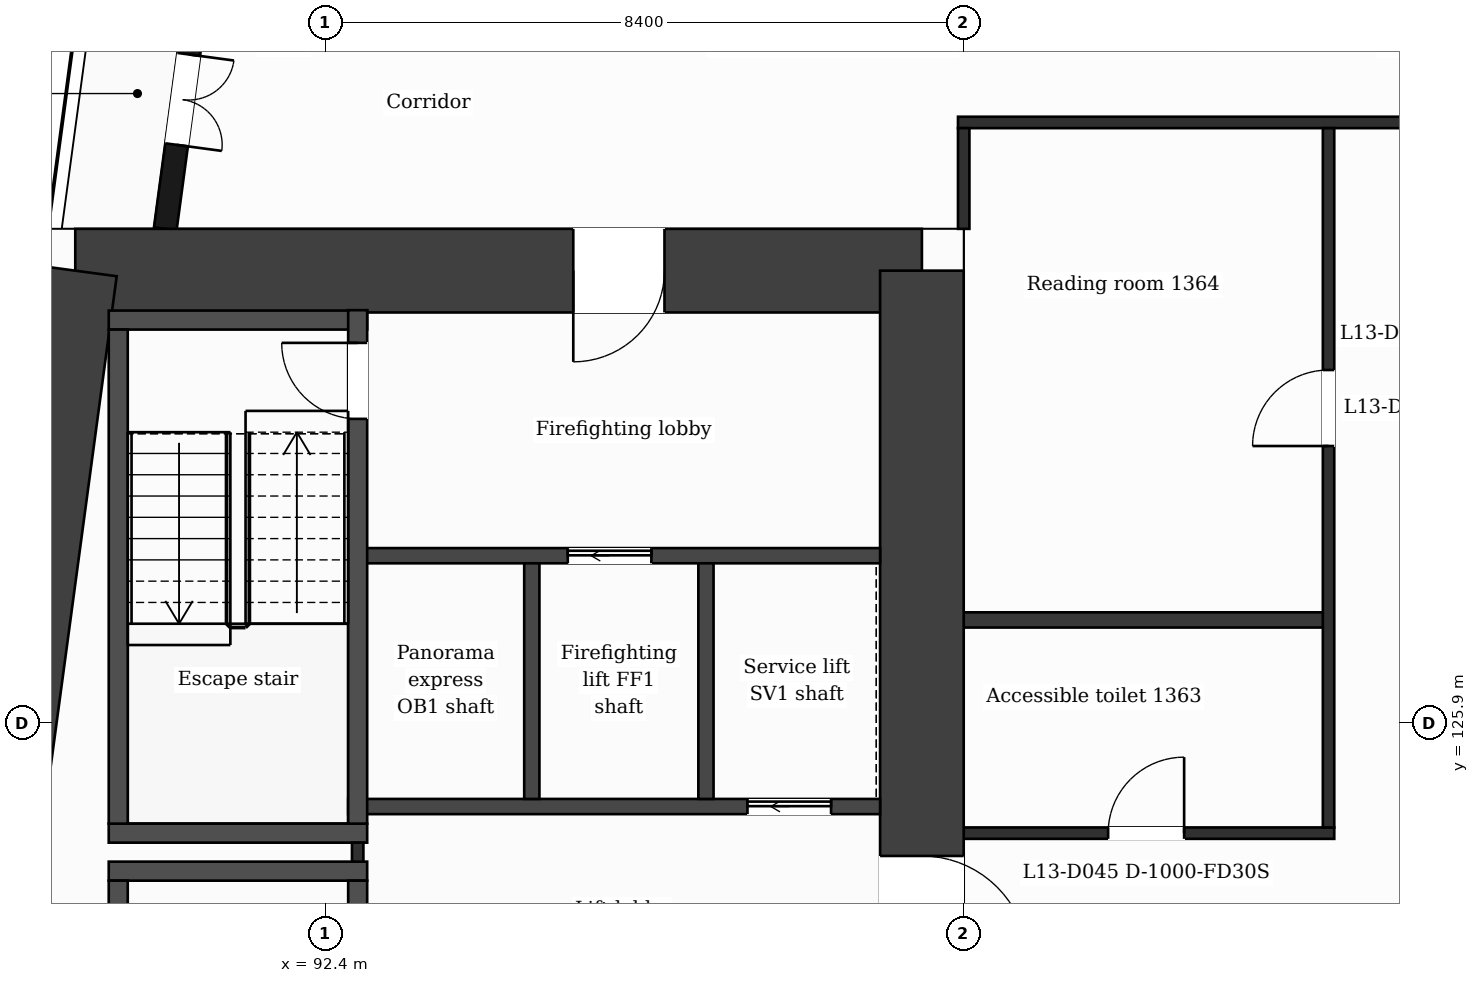
"""IFC4 building model, lengths in metres.
Left out: names, types, materials, properties, quantities, classifications, styles, units other than length and angle.
Written with IfcOpenShell. Run it as: python <this file> out.ifc"""

import sys

from ifc_helpers import new_model, si_unit, direction, frame, frame_2d, origin, place, context, subcontext, project, spatial, rectangle, extrude, element, fill, save


model = new_model("IFC4")
c1 = context("Model", 3, precision=1e-05, world=origin(), true_north=direction((0.0, 1.0)))
c2 = subcontext(c1, "Body", "Model", "MODEL_VIEW")
j1 = project(units=[si_unit("LENGTHUNIT", "METRE"), si_unit("PLANEANGLEUNIT", "RADIAN")], contexts=[c1])
p1 = place(None, origin())
s1 = spatial("IfcSite", under=j1, at=p1, CompositionType="ELEMENT")
p2 = place(p1, origin())
s2 = spatial("IfcBuilding", under=s1, at=p2, CompositionType="ELEMENT")
p3 = place(p2, frame((0.0, 0.0, 63.5)))
s3 = spatial("IfcBuildingStorey", under=s2, at=p3, CompositionType="ELEMENT", Elevation=63.5)
p4 = place(p3, frame((89.112, 131.85, 0.0), z_axis=(0.0, 0.0, 1.0), x_axis=(1.0, 0.0, 0.0)))
e1 = element("IfcWall", 1, at=p4, inside=s3, PredefinedType="SHEAR", context=c2, shape_type="SweptSolid", body=[
    extrude(rectangle(XDim=11.138, YDim=1.1, at=frame_2d((5.569, 0.0))), origin(), (0.0, 0.0, 1.0), 3.5),
])
p5 = place(p4, frame((6.552, 0.0, 0.0)))
e2 = element("IfcOpeningElement", 2, at=p5, cuts=e1, PredefinedType="OPENING", context=c2, shape_type="SweptSolid", body=[
    extrude(rectangle(XDim=1.2, YDim=2.1, at=frame_2d((0.6, 1.05))), frame((0.0, 0.56, 0.0), z_axis=(0.0, -1.0, 0.0), x_axis=(1.0, 0.0, 0.0)), (0.0, 0.0, 1.0), 1.12),
])
p6 = place(p3, frame((100.25, 131.85, 0.0), z_axis=(0.0, 0.0, 1.0), x_axis=(0.0, -1.0, 0.0)))
e3 = element("IfcWall", 3, at=p6, inside=s3, PredefinedType="SHEAR", context=c2, shape_type="SweptSolid", body=[
    extrude(rectangle(XDim=20.9, YDim=1.1, at=frame_2d((10.45, 0.0))), origin(), (0.0, 0.0, 1.0), 3.5),
])
p7 = place(p6, frame((7.7, 0.0, 0.0)))
e4 = element("IfcOpeningElement", 4, at=p7, cuts=e3, PredefinedType="OPENING", context=c2, shape_type="SweptSolid", body=[
    extrude(rectangle(XDim=1.4, YDim=2.1, at=frame_2d((0.7, 1.05))), frame((0.0, 0.56, 0.0), z_axis=(0.0, -1.0, 0.0), x_axis=(1.0, 0.0, 0.0)), (0.0, 0.0, 1.0), 1.12),
])
p8 = place(p3, frame((86.298, 110.95, 0.0), z_axis=(0.0, 0.0, 1.0), x_axis=(0.133400422634, 0.99106222168, 0.0)))
e5 = element("IfcWall", 5, at=p8, inside=s3, PredefinedType="SHEAR", context=c2, shape_type="SweptSolid", body=[
    extrude(rectangle(XDim=21.089, YDim=1.1, at=frame_2d((10.544, 0.0))), origin(), (0.0, 0.0, 1.0), 3.5),
])
p9 = place(p3, frame((91.177, 138.95, 0.0), z_axis=(0.0, 0.0, 1.0), x_axis=(-0.133426664613, -0.991058689065, 0.0)))
e6 = element("IfcWall", 6, at=p9, inside=s3, PredefinedType="SOLIDWALL", context=c2, shape_type="SweptSolid", body=[
    extrude(rectangle(XDim=6.609, YDim=0.3, at=frame_2d((3.305, 0.0))), origin(), (0.0, 0.0, 1.0), 3.18),
])
p10 = place(p9, frame((1.039, 0.0, 0.9)))
e7 = element("IfcOpeningElement", 7, at=p10, cuts=e6, PredefinedType="OPENING", context=c2, shape_type="SweptSolid", body=[
    extrude(rectangle(XDim=1.2, YDim=2.1, at=frame_2d((0.6, 1.05))), frame((0.0, 0.16, 0.0), z_axis=(0.0, -1.0, 0.0), x_axis=(1.0, 0.0, 0.0)), (0.0, 0.0, 1.0), 0.32),
])
p11 = place(p9, frame((4.294, 0.0, 0.0)))
e8 = element("IfcOpeningElement", 8, at=p11, cuts=e6, PredefinedType="OPENING", context=c2, shape_type="SweptSolid", body=[
    extrude(rectangle(XDim=1.2, YDim=2.4, at=frame_2d((0.6, 1.2))), frame((0.0, 0.16, 0.0), z_axis=(0.0, -1.0, 0.0), x_axis=(1.0, 0.0, 0.0)), (0.0, 0.0, 1.0), 0.32),
])
for number, where, z_axis, x_axis in (
    (9, (89.552, 123.95, 0.0), (0.0, 0.0, 1.0), (1.0, 0.0, 0.0)),
    (10, (89.552, 124.45, 0.0), (0.0, 0.0, 1.0), (1.0, 0.0, 0.0)),
):
    element("IfcWall", number, at=place(p3, frame(where, z_axis=z_axis, x_axis=x_axis)), inside=s3, PredefinedType="PARTITIONING", context=c2, shape_type="SweptSolid", body=[
        extrude(rectangle(XDim=3.4, YDim=0.25, at=frame_2d((1.7, 0.0))), origin(), (0.0, 0.0, 1.0), 3.18),
    ])
p12 = place(p3, frame((100.8, 124.45, 0.0), z_axis=(0.0, 0.0, 1.0), x_axis=(1.0, 0.0, 0.0)))
e11 = element("IfcWall", 11, at=p12, inside=s3, PredefinedType="PARTITIONING", context=c2, shape_type="SweptSolid", body=[
    extrude(rectangle(XDim=4.875, YDim=0.15, at=frame_2d((2.438, 0.0))), origin(), (0.0, 0.0, 1.0), 3.18),
])
p13 = place(p12, frame((1.9, 0.0, 0.0)))
e12 = element("IfcOpeningElement", 12, at=p13, cuts=e11, PredefinedType="OPENING", context=c2, shape_type="SweptSolid", body=[
    extrude(rectangle(XDim=1.0, YDim=2.1, at=frame_2d((0.5, 1.05))), frame((0.0, 0.085, 0.0), z_axis=(0.0, -1.0, 0.0), x_axis=(1.0, 0.0, 0.0)), (0.0, 0.0, 1.0), 0.17),
])
p14 = place(p3, frame((92.702, 124.8, 0.0), z_axis=(0.0, 0.0, 1.0), x_axis=(1.0, 0.0, 0.0)))
e13 = element("IfcWall", 13, at=p14, inside=s3, PredefinedType="PARTITIONING", context=c2, shape_type="SweptSolid", body=[
    extrude(rectangle(XDim=6.998, YDim=0.2, at=frame_2d((3.499, 0.0))), origin(), (0.0, 0.0, 1.0), 3.18),
])
p15 = place(p14, frame((5.253, 0.0, 0.0)))
e14 = element("IfcOpeningElement", 14, at=p15, cuts=e13, PredefinedType="OPENING", context=c2, shape_type="SweptSolid", body=[
    extrude(rectangle(XDim=1.1, YDim=2.1, at=frame_2d((0.55, 1.05))), frame((0.0, 0.11, 0.0), z_axis=(0.0, -1.0, 0.0), x_axis=(1.0, 0.0, 0.0)), (0.0, 0.0, 1.0), 0.22),
])
p16 = place(p3, frame((100.8, 127.255, 0.0), z_axis=(0.0, 0.0, 1.0), x_axis=(1.0, 0.0, 0.0)))
e15 = element("IfcWall", 15, at=p16, inside=s3, PredefinedType="PARTITIONING", context=c2, shape_type="SweptSolid", body=[
    extrude(rectangle(XDim=4.8, YDim=0.2, at=frame_2d((2.4, 0.0))), origin(), (0.0, 0.0, 1.0), 3.18),
])
p17 = place(p3, frame((92.827, 128.1, 0.0), z_axis=(0.0, 0.0, 1.0), x_axis=(1.0, 0.0, 0.0)))
e16 = element("IfcWall", 16, at=p17, inside=s3, PredefinedType="PARTITIONING", context=c2, shape_type="SweptSolid", body=[
    extrude(rectangle(XDim=6.873, YDim=0.2, at=frame_2d((3.437, 0.0))), origin(), (0.0, 0.0, 1.0), 3.18),
])
p18 = place(p17, frame((2.764, 0.0, 0.0)))
e17 = element("IfcOpeningElement", 17, at=p18, cuts=e16, PredefinedType="OPENING", context=c2, shape_type="SweptSolid", body=[
    extrude(rectangle(XDim=1.1, YDim=2.1, at=frame_2d((0.55, 1.05))), frame((0.0, 0.11, 0.0), z_axis=(0.0, -1.0, 0.0), x_axis=(1.0, 0.0, 0.0)), (0.0, 0.0, 1.0), 0.22),
])
p19 = place(p3, frame((89.552, 131.2, 0.0), z_axis=(0.0, 0.0, 1.0), x_axis=(1.0, 0.0, 0.0)))
e18 = element("IfcWall", 18, at=p19, inside=s3, PredefinedType="PARTITIONING", context=c2, shape_type="SweptSolid", body=[
    extrude(rectangle(XDim=3.4, YDim=0.25, at=frame_2d((1.7, 0.0))), origin(), (0.0, 0.0, 1.0), 3.18),
])
p20 = place(p3, frame((100.725, 133.8, 0.0), z_axis=(0.0, 0.0, 1.0), x_axis=(1.0, 0.0, 0.0)))
e19 = element("IfcWall", 19, at=p20, inside=s3, PredefinedType="PARTITIONING", context=c2, shape_type="SweptSolid", body=[
    extrude(rectangle(XDim=25.35, YDim=0.15, at=frame_2d((12.675, 0.0))), origin(), (0.0, 0.0, 1.0), 3.18),
])
p21 = place(p3, frame((89.677, 117.07, 0.0), z_axis=(0.0, 0.0, 1.0), x_axis=(0.0, 1.0, 0.0)))
e20 = element("IfcWall", 20, at=p21, inside=s3, PredefinedType="PARTITIONING", context=c2, shape_type="SweptSolid", body=[
    extrude(rectangle(XDim=6.755, YDim=0.25, at=frame_2d((3.377, 0.0))), origin(), (0.0, 0.0, 1.0), 3.18),
])
p22 = place(p3, frame((89.677, 124.575, 0.0), z_axis=(0.0, 0.0, 1.0), x_axis=(0.0, 1.0, 0.0)))
e21 = element("IfcWall", 21, at=p22, inside=s3, PredefinedType="PARTITIONING", context=c2, shape_type="SweptSolid", body=[
    extrude(rectangle(XDim=6.5, YDim=0.25, at=frame_2d((3.25, 0.0))), origin(), (0.0, 0.0, 1.0), 3.18),
])
p23 = place(p3, frame((92.827, 124.075, 0.0), z_axis=(0.0, 0.0, 1.0), x_axis=(0.0, 1.0, 0.0)))
e22 = element("IfcWall", 22, at=p23, inside=s3, PredefinedType="PARTITIONING", context=c2, shape_type="SweptSolid", body=[
    extrude(rectangle(XDim=0.25, YDim=0.15, at=frame_2d((0.125, 0.0))), origin(), (0.0, 0.0, 1.0), 3.18),
])
p24 = place(p3, frame((92.827, 117.07, 0.0), z_axis=(0.0, 0.0, 1.0), x_axis=(0.0, 1.0, 0.0)))
e23 = element("IfcWall", 23, at=p24, inside=s3, PredefinedType="PARTITIONING", context=c2, shape_type="SweptSolid", body=[
    extrude(rectangle(XDim=6.755, YDim=0.25, at=frame_2d((3.377, 0.0))), origin(), (0.0, 0.0, 1.0), 3.18),
])
p25 = place(p24, frame((5.455, 0.0, 0.0)))
e24 = element("IfcOpeningElement", 24, at=p25, cuts=e23, PredefinedType="OPENING", context=c2, shape_type="SweptSolid", body=[
    extrude(rectangle(XDim=0.95, YDim=2.1, at=frame_2d((0.475, 1.05))), frame((0.0, 0.135, 0.0), z_axis=(0.0, -1.0, 0.0), x_axis=(1.0, 0.0, 0.0)), (0.0, 0.0, 1.0), 0.27),
])
p26 = place(p3, frame((92.827, 124.575, 0.0), z_axis=(0.0, 0.0, 1.0), x_axis=(0.0, 1.0, 0.0)))
e25 = element("IfcWall", 25, at=p26, inside=s3, PredefinedType="PARTITIONING", context=c2, shape_type="SweptSolid", body=[
    extrude(rectangle(XDim=6.755, YDim=0.25, at=frame_2d((3.377, 0.0))), origin(), (0.0, 0.0, 1.0), 3.18),
])
p27 = place(p26, frame((5.325, 0.0, 0.0)))
e26 = element("IfcOpeningElement", 26, at=p27, cuts=e25, PredefinedType="OPENING", context=c2, shape_type="SweptSolid", body=[
    extrude(rectangle(XDim=1.0, YDim=2.1, at=frame_2d((0.5, 1.05))), frame((0.0, 0.135, 0.0), z_axis=(0.0, -1.0, 0.0), x_axis=(1.0, 0.0, 0.0)), (0.0, 0.0, 1.0), 0.27),
])
for number, where, z_axis, x_axis in (
    (27, (95.118, 124.9, 0.0), (0.0, 0.0, 1.0), (0.0, 1.0, 0.0)),
    (28, (97.409, 124.9, 0.0), (0.0, 0.0, 1.0), (0.0, 1.0, 0.0)),
):
    element("IfcWall", number, at=place(p3, frame(where, z_axis=z_axis, x_axis=x_axis)), inside=s3, PredefinedType="PARTITIONING", context=c2, shape_type="SweptSolid", body=[
        extrude(rectangle(XDim=3.1, YDim=0.2, at=frame_2d((1.55, 0.0))), origin(), (0.0, 0.0, 1.0), 3.18),
    ])
p28 = place(p3, frame((100.8, 132.4, 0.0), z_axis=(0.0, 0.0, 1.0), x_axis=(0.0, 1.0, 0.0)))
e29 = element("IfcWall", 29, at=p28, inside=s3, PredefinedType="PARTITIONING", context=c2, shape_type="SweptSolid", body=[
    extrude(rectangle(XDim=1.325, YDim=0.15, at=frame_2d((0.663, 0.0))), origin(), (0.0, 0.0, 1.0), 3.18),
])
p29 = place(p3, frame((105.6, 124.525, 0.0), z_axis=(0.0, 0.0, 1.0), x_axis=(0.0, 1.0, 0.0)))
e30 = element("IfcWall", 30, at=p29, inside=s3, PredefinedType="PARTITIONING", context=c2, shape_type="SweptSolid", body=[
    extrude(rectangle(XDim=9.2, YDim=0.15, at=frame_2d((4.6, 0.0))), origin(), (0.0, 0.0, 1.0), 3.18),
])
p30 = place(p29, frame((5.018, 0.0, 0.0)))
e31 = element("IfcOpeningElement", 31, at=p30, cuts=e30, PredefinedType="OPENING", context=c2, shape_type="SweptSolid", body=[
    extrude(rectangle(XDim=1.0, YDim=2.1, at=frame_2d((0.5, 1.05))), frame((0.0, 0.085, 0.0), z_axis=(0.0, -1.0, 0.0), x_axis=(1.0, 0.0, 0.0)), (0.0, 0.0, 1.0), 0.17),
])
p31 = place(p11, origin())
e32 = element("IfcDoor", 32, at=p31, inside=s3, OperationType="DOUBLE_DOOR_SINGLE_SWING", PredefinedType="DOOR", context=c2, shape_type="SweptSolid", body=[
    extrude(rectangle(XDim=1.2, YDim=2.4, at=frame_2d((0.6, 1.2))), frame((0.0, 0.025, 0.0), z_axis=(0.0, -1.0, 0.0), x_axis=(1.0, 0.0, 0.0)), (0.0, 0.0, 1.0), 0.05),
])
fill(e8, e32)
p32 = place(p18, origin())
e33 = element("IfcDoor", 33, at=p32, inside=s3, OperationType="SLIDING_TO_LEFT", PredefinedType="DOOR", context=c2, shape_type="SweptSolid", body=[
    extrude(rectangle(XDim=1.1, YDim=2.1, at=frame_2d((0.55, 1.05))), frame((0.0, 0.025, 0.0), z_axis=(0.0, -1.0, 0.0), x_axis=(1.0, 0.0, 0.0)), (0.0, 0.0, 1.0), 0.05),
])
fill(e17, e33)
p33 = place(p15, origin())
e34 = element("IfcDoor", 34, at=p33, inside=s3, OperationType="SLIDING_TO_LEFT", PredefinedType="DOOR", context=c2, shape_type="SweptSolid", body=[
    extrude(rectangle(XDim=1.1, YDim=2.1, at=frame_2d((0.55, 1.05))), frame((0.0, 0.025, 0.0), z_axis=(0.0, -1.0, 0.0), x_axis=(1.0, 0.0, 0.0)), (0.0, 0.0, 1.0), 0.05),
])
fill(e14, e34)
p34 = place(p27, origin())
e35 = element("IfcDoor", 35, at=p34, inside=s3, OperationType="SINGLE_SWING_RIGHT", PredefinedType="DOOR", context=c2, shape_type="SweptSolid", body=[
    extrude(rectangle(XDim=1.0, YDim=2.1, at=frame_2d((0.5, 1.05))), frame((0.0, 0.025, 0.0), z_axis=(0.0, -1.0, 0.0), x_axis=(1.0, 0.0, 0.0)), (0.0, 0.0, 1.0), 0.05),
])
fill(e26, e35)
p35 = place(p13, origin())
e36 = element("IfcDoor", 36, at=p35, inside=s3, OperationType="SINGLE_SWING_RIGHT", PredefinedType="DOOR", context=c2, shape_type="SweptSolid", body=[
    extrude(rectangle(XDim=1.0, YDim=2.1, at=frame_2d((0.5, 1.05))), frame((0.0, 0.025, 0.0), z_axis=(0.0, -1.0, 0.0), x_axis=(1.0, 0.0, 0.0)), (0.0, 0.0, 1.0), 0.05),
])
fill(e12, e36)
p36 = place(p30, origin())
e37 = element("IfcDoor", 37, at=p36, inside=s3, OperationType="SINGLE_SWING_LEFT", PredefinedType="DOOR", context=c2, shape_type="SweptSolid", body=[
    extrude(rectangle(XDim=1.0, YDim=2.1, at=frame_2d((0.5, 1.05))), frame((0.0, 0.025, 0.0), z_axis=(0.0, -1.0, 0.0), x_axis=(1.0, 0.0, 0.0)), (0.0, 0.0, 1.0), 0.05),
])
fill(e31, e37)
p37 = place(p5, origin())
e38 = element("IfcDoor", 38, at=p37, inside=s3, OperationType="SINGLE_SWING_LEFT", PredefinedType="DOOR", context=c2, shape_type="SweptSolid", body=[
    extrude(rectangle(XDim=1.2, YDim=2.1, at=frame_2d((0.6, 1.05))), frame((0.0, 0.025, 0.0), z_axis=(0.0, -1.0, 0.0), x_axis=(1.0, 0.0, 0.0)), (0.0, 0.0, 1.0), 0.05),
])
fill(e2, e38)
p38 = place(p7, origin())
e39 = element("IfcDoor", 39, at=p38, inside=s3, OperationType="SINGLE_SWING_RIGHT", PredefinedType="DOOR", context=c2, shape_type="SweptSolid", body=[
    extrude(rectangle(XDim=1.4, YDim=2.1, at=frame_2d((0.7, 1.05))), frame((0.0, 0.025, 0.0), z_axis=(0.0, -1.0, 0.0), x_axis=(1.0, 0.0, 0.0)), (0.0, 0.0, 1.0), 0.05),
])
fill(e4, e39)
save(model, sys.argv[1])
